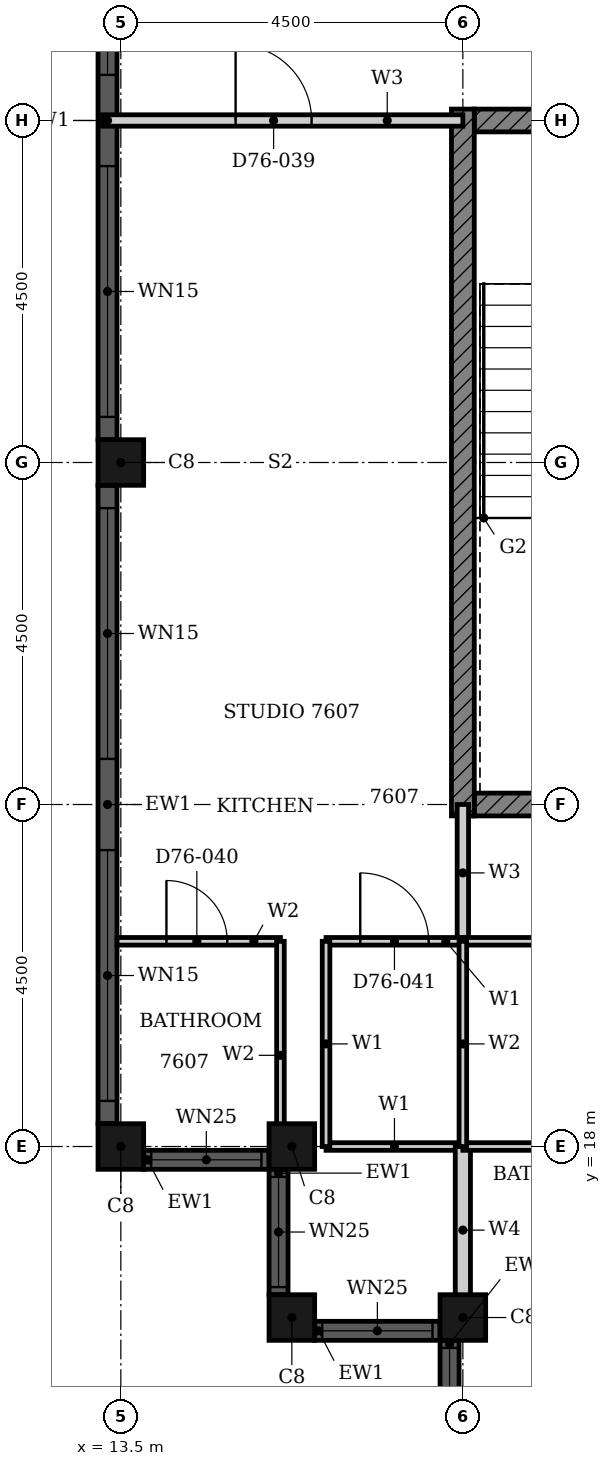
"""IFC4 building model, lengths in metres.
Left out: names, types, materials, properties, quantities, classifications, styles, units other than length and angle.
Written with IfcOpenShell. Run it as: python <this file> out.ifc"""

import sys

from ifc_helpers import new_model, si_unit, direction, frame, frame_2d, origin, origin_2d, place, context, subcontext, project, spatial, rectangle, hollow_rectangle, extrude, element, fill, save


model = new_model("IFC4")
c1 = context("Model", 3, precision=1e-05, world=origin(), true_north=direction((0.0, 1.0)))
c2 = subcontext(c1, "Body", "Model", "MODEL_VIEW")
j1 = project(units=[si_unit("LENGTHUNIT", "METRE"), si_unit("PLANEANGLEUNIT", "RADIAN")], contexts=[c1])
p1 = place(None, origin())
s1 = spatial("IfcSite", under=j1, at=p1, CompositionType="ELEMENT")
p2 = place(p1, origin())
s2 = spatial("IfcBuilding", under=s1, at=p2, CompositionType="ELEMENT")
p3 = place(p2, frame((0.0, 0.0, 298.2)))
s3 = spatial("IfcBuildingStorey", under=s2, at=p3, CompositionType="ELEMENT", Elevation=298.2)
for number, where, z_axis, x_axis in (
    (1, (13.5, 27.0, 0.0), (0.0, 0.0, 1.0), (1.0, 0.0, 0.0)),
    (2, (13.5, 18.0, 0.0), (0.0, 0.0, 1.0), (1.0, 0.0, 0.0)),
    (3, (15.75, 18.0, 0.0), (0.0, 0.0, 1.0), (1.0, 0.0, 0.0)),
    (4, (15.75, 15.75, 0.0), (0.0, 0.0, 1.0), (1.0, 0.0, 0.0)),
    (5, (18.0, 15.75, 0.0), (0.0, 0.0, 1.0), (1.0, 0.0, 0.0)),
):
    element("IfcColumn", number, at=place(p3, frame(where, z_axis=z_axis, x_axis=x_axis)), inside=s3, PredefinedType="COLUMN", context=c2, shape_type="SweptSolid", body=[
        extrude(hollow_rectangle(XDim=0.6, YDim=0.6, WallThickness=0.02, at=origin_2d()), origin(), (0.0, 0.0, 1.0), 3.7),
    ])
p4 = place(p3, frame((13.325, 35.7, 0.0), z_axis=(0.0, 0.0, 1.0), x_axis=(0.0, -1.0, 0.0)))
e6 = element("IfcWall", 6, at=p4, inside=s3, PredefinedType="SOLIDWALL", context=c2, shape_type="SweptSolid", body=[
    extrude(rectangle(XDim=8.4, YDim=0.25, at=frame_2d((4.2, 0.0))), origin(), (0.0, 0.0, 1.0), 3.7),
])
p5 = place(p4, frame((0.3, 0.0, 0.45)))
e7 = element("IfcOpeningElement", 7, at=p5, cuts=e6, PredefinedType="OPENING", context=c2, shape_type="SweptSolid", body=[
    extrude(rectangle(XDim=3.3, YDim=2.3, at=frame_2d((1.65, 1.15))), frame((0.0, 0.135, 0.0), z_axis=(0.0, -1.0, 0.0), x_axis=(1.0, 0.0, 0.0)), (0.0, 0.0, 1.0), 0.27),
])
p6 = place(p4, frame((4.8, 0.0, 0.45)))
e8 = element("IfcOpeningElement", 8, at=p6, cuts=e6, PredefinedType="OPENING", context=c2, shape_type="SweptSolid", body=[
    extrude(rectangle(XDim=3.3, YDim=2.3, at=frame_2d((1.65, 1.15))), frame((0.0, 0.135, 0.0), z_axis=(0.0, -1.0, 0.0), x_axis=(1.0, 0.0, 0.0)), (0.0, 0.0, 1.0), 0.27),
])
p7 = place(p3, frame((13.325, 26.7, 0.0), z_axis=(0.0, 0.0, 1.0), x_axis=(0.0, -1.0, 0.0)))
e9 = element("IfcWall", 9, at=p7, inside=s3, PredefinedType="SOLIDWALL", context=c2, shape_type="SweptSolid", body=[
    extrude(rectangle(XDim=8.4, YDim=0.25, at=frame_2d((4.2, 0.0))), origin(), (0.0, 0.0, 1.0), 3.7),
])
p8 = place(p7, frame((0.3, 0.0, 0.45)))
e10 = element("IfcOpeningElement", 10, at=p8, cuts=e9, PredefinedType="OPENING", context=c2, shape_type="SweptSolid", body=[
    extrude(rectangle(XDim=3.3, YDim=2.3, at=frame_2d((1.65, 1.15))), frame((0.0, 0.135, 0.0), z_axis=(0.0, -1.0, 0.0), x_axis=(1.0, 0.0, 0.0)), (0.0, 0.0, 1.0), 0.27),
])
p9 = place(p7, frame((4.8, 0.0, 0.45)))
e11 = element("IfcOpeningElement", 11, at=p9, cuts=e9, PredefinedType="OPENING", context=c2, shape_type="SweptSolid", body=[
    extrude(rectangle(XDim=3.3, YDim=2.3, at=frame_2d((1.65, 1.15))), frame((0.0, 0.135, 0.0), z_axis=(0.0, -1.0, 0.0), x_axis=(1.0, 0.0, 0.0)), (0.0, 0.0, 1.0), 0.27),
])
p10 = place(p3, frame((13.8, 17.825, 0.0), z_axis=(0.0, 0.0, 1.0), x_axis=(1.0, 0.0, 0.0)))
e12 = element("IfcWall", 12, at=p10, inside=s3, PredefinedType="SOLIDWALL", context=c2, shape_type="SweptSolid", body=[
    extrude(rectangle(XDim=1.65, YDim=0.25, at=frame_2d((0.825, 0.0))), origin(), (0.0, 0.0, 1.0), 3.7),
])
p11 = place(p10, frame((0.1, 0.0, 0.9)))
e13 = element("IfcOpeningElement", 13, at=p11, cuts=e12, PredefinedType="OPENING", context=c2, shape_type="SweptSolid", body=[
    extrude(rectangle(XDim=1.45, YDim=1.85, at=frame_2d((0.725, 0.925))), frame((0.0, 0.135, 0.0), z_axis=(0.0, -1.0, 0.0), x_axis=(1.0, 0.0, 0.0)), (0.0, 0.0, 1.0), 0.27),
])
p12 = place(p3, frame((15.575, 17.7, 0.0), z_axis=(0.0, 0.0, 1.0), x_axis=(0.0, -1.0, 0.0)))
e14 = element("IfcWall", 14, at=p12, inside=s3, PredefinedType="SOLIDWALL", context=c2, shape_type="SweptSolid", body=[
    extrude(rectangle(XDim=1.65, YDim=0.25, at=frame_2d((0.825, 0.0))), origin(), (0.0, 0.0, 1.0), 3.7),
])
p13 = place(p12, frame((0.1, 0.0, 0.9)))
e15 = element("IfcOpeningElement", 15, at=p13, cuts=e14, PredefinedType="OPENING", context=c2, shape_type="SweptSolid", body=[
    extrude(rectangle(XDim=1.45, YDim=1.85, at=frame_2d((0.725, 0.925))), frame((0.0, 0.135, 0.0), z_axis=(0.0, -1.0, 0.0), x_axis=(1.0, 0.0, 0.0)), (0.0, 0.0, 1.0), 0.27),
])
p14 = place(p3, frame((16.05, 15.575, 0.0), z_axis=(0.0, 0.0, 1.0), x_axis=(1.0, 0.0, 0.0)))
e16 = element("IfcWall", 16, at=p14, inside=s3, PredefinedType="SOLIDWALL", context=c2, shape_type="SweptSolid", body=[
    extrude(rectangle(XDim=1.65, YDim=0.25, at=frame_2d((0.825, 0.0))), origin(), (0.0, 0.0, 1.0), 3.7),
])
p15 = place(p14, frame((0.1, 0.0, 0.9)))
e17 = element("IfcOpeningElement", 17, at=p15, cuts=e16, PredefinedType="OPENING", context=c2, shape_type="SweptSolid", body=[
    extrude(rectangle(XDim=1.45, YDim=1.85, at=frame_2d((0.725, 0.925))), frame((0.0, 0.135, 0.0), z_axis=(0.0, -1.0, 0.0), x_axis=(1.0, 0.0, 0.0)), (0.0, 0.0, 1.0), 0.27),
])
p16 = place(p3, frame((17.825, 15.45, 0.0), z_axis=(0.0, 0.0, 1.0), x_axis=(0.0, -1.0, 0.0)))
e18 = element("IfcWall", 18, at=p16, inside=s3, PredefinedType="SOLIDWALL", context=c2, shape_type="SweptSolid", body=[
    extrude(rectangle(XDim=1.65, YDim=0.25, at=frame_2d((0.825, 0.0))), origin(), (0.0, 0.0, 1.0), 3.7),
])
p17 = place(p16, frame((0.1, 0.0, 0.9)))
e19 = element("IfcOpeningElement", 19, at=p17, cuts=e18, PredefinedType="OPENING", context=c2, shape_type="SweptSolid", body=[
    extrude(rectangle(XDim=1.45, YDim=1.85, at=frame_2d((0.725, 0.925))), frame((0.0, 0.135, 0.0), z_axis=(0.0, -1.0, 0.0), x_axis=(1.0, 0.0, 0.0)), (0.0, 0.0, 1.0), 0.27),
])
p18 = place(p3, frame((18.15, 22.5, 0.0), z_axis=(0.0, 0.0, 1.0), x_axis=(1.0, 0.0, 0.0)))
e20 = element("IfcWall", 20, at=p18, inside=s3, PredefinedType="SHEAR", context=c2, shape_type="SweptSolid", body=[
    extrude(rectangle(XDim=4.225, YDim=0.3, at=frame_2d((2.113, 0.0))), origin(), (0.0, 0.0, 1.0), 3.4),
])
p19 = place(p3, frame((18.15, 31.5, 0.0), z_axis=(0.0, 0.0, 1.0), x_axis=(1.0, 0.0, 0.0)))
e21 = element("IfcWall", 21, at=p19, inside=s3, PredefinedType="SHEAR", context=c2, shape_type="SweptSolid", body=[
    extrude(rectangle(XDim=9.368, YDim=0.3, at=frame_2d((4.684, 0.0))), origin(), (0.0, 0.0, 1.0), 3.4),
])
p20 = place(p19, frame((4.736, 0.0, 0.0)))
e22 = element("IfcOpeningElement", 22, at=p20, cuts=e21, PredefinedType="OPENING", context=c2, shape_type="SweptSolid", body=[
    extrude(rectangle(XDim=1.8, YDim=2.1, at=frame_2d((0.9, 1.05))), frame((0.0, 0.16, 0.0), z_axis=(0.0, -1.0, 0.0), x_axis=(1.0, 0.0, 0.0)), (0.0, 0.0, 1.0), 0.32),
])
p21 = place(p3, frame((18.0, 22.35, 0.0), z_axis=(0.0, 0.0, 1.0), x_axis=(0.0, 1.0, 0.0)))
e23 = element("IfcWall", 23, at=p21, inside=s3, PredefinedType="SHEAR", context=c2, shape_type="SweptSolid", body=[
    extrude(rectangle(XDim=9.3, YDim=0.3, at=frame_2d((4.65, 0.0))), origin(), (0.0, 0.0, 1.0), 3.4),
])
p22 = place(p3, frame((13.26, 31.5, 0.0), z_axis=(0.0, 0.0, 1.0), x_axis=(1.0, 0.0, 0.0)))
e24 = element("IfcWall", 24, at=p22, inside=s3, PredefinedType="PARTITIONING", context=c2, shape_type="SweptSolid", body=[
    extrude(rectangle(XDim=4.74, YDim=0.15, at=frame_2d((2.37, 0.0))), origin(), (0.0, 0.0, 1.0), 3.4),
])
p23 = place(p22, frame((1.75, 0.0, 0.0)))
e25 = element("IfcOpeningElement", 25, at=p23, cuts=e24, PredefinedType="OPENING", context=c2, shape_type="SweptSolid", body=[
    extrude(rectangle(XDim=1.0, YDim=2.2, at=frame_2d((0.5, 1.1))), frame((0.0, 0.085, 0.0), z_axis=(0.0, -1.0, 0.0), x_axis=(1.0, 0.0, 0.0)), (0.0, 0.0, 1.0), 0.17),
])
p24 = place(p3, frame((18.0, 20.7, 0.0), z_axis=(0.0, 0.0, 1.0), x_axis=(0.0, 1.0, 0.0)))
e26 = element("IfcWall", 26, at=p24, inside=s3, PredefinedType="PARTITIONING", context=c2, shape_type="SweptSolid", body=[
    extrude(rectangle(XDim=1.8, YDim=0.15, at=frame_2d((0.9, 0.0))), origin(), (0.0, 0.0, 1.0), 3.4),
])
p25 = place(p3, frame((16.2, 18.0, 0.0), z_axis=(0.0, 0.0, 1.0), x_axis=(1.0, 0.0, 0.0)))
e27 = element("IfcWall", 27, at=p25, inside=s3, PredefinedType="PARTITIONING", context=c2, shape_type="SweptSolid", body=[
    extrude(rectangle(XDim=1.8, YDim=0.1, at=frame_2d((0.9, 0.0))), origin(), (0.0, 0.0, 1.0), 3.4),
])
p26 = place(p3, frame((16.2, 20.7, 0.0), z_axis=(0.0, 0.0, 1.0), x_axis=(1.0, 0.0, 0.0)))
e28 = element("IfcWall", 28, at=p26, inside=s3, PredefinedType="PARTITIONING", context=c2, shape_type="SweptSolid", body=[
    extrude(rectangle(XDim=1.8, YDim=0.1, at=frame_2d((0.9, 0.0))), origin(), (0.0, 0.0, 1.0), 3.4),
])
p27 = place(p26, frame((0.45, 0.0, 0.0)))
e29 = element("IfcOpeningElement", 29, at=p27, cuts=e28, PredefinedType="OPENING", context=c2, shape_type="SweptSolid", body=[
    extrude(rectangle(XDim=0.9, YDim=2.1, at=frame_2d((0.45, 1.05))), frame((0.0, 0.06, 0.0), z_axis=(0.0, -1.0, 0.0), x_axis=(1.0, 0.0, 0.0)), (0.0, 0.0, 1.0), 0.12),
])
p28 = place(p3, frame((16.2, 18.0, 0.0), z_axis=(0.0, 0.0, 1.0), x_axis=(0.0, 1.0, 0.0)))
e30 = element("IfcWall", 30, at=p28, inside=s3, PredefinedType="PARTITIONING", context=c2, shape_type="SweptSolid", body=[
    extrude(rectangle(XDim=2.7, YDim=0.1, at=frame_2d((1.35, 0.0))), origin(), (0.0, 0.0, 1.0), 3.4),
])
p29 = place(p3, frame((18.0, 15.8, 0.0), z_axis=(0.0, 0.0, 1.0), x_axis=(0.0, 1.0, 0.0)))
e31 = element("IfcWall", 31, at=p29, inside=s3, PredefinedType="PARTITIONING", context=c2, shape_type="SweptSolid", body=[
    extrude(rectangle(XDim=2.2, YDim=0.2, at=frame_2d((1.1, 0.0))), origin(), (0.0, 0.0, 1.0), 3.4),
])
for number, where, z_axis, x_axis in (
    (32, (18.0, 18.0, 0.0), (0.0, 0.0, 1.0), (1.0, 0.0, 0.0)),
    (33, (18.0, 20.7, 0.0), (0.0, 0.0, 1.0), (1.0, 0.0, 0.0)),
):
    element("IfcWall", number, at=place(p3, frame(where, z_axis=z_axis, x_axis=x_axis)), inside=s3, PredefinedType="PARTITIONING", context=c2, shape_type="SweptSolid", body=[
        extrude(rectangle(XDim=2.4, YDim=0.1, at=frame_2d((1.2, 0.0))), origin(), (0.0, 0.0, 1.0), 3.4),
    ])
p30 = place(p3, frame((13.45, 20.7, 0.0), z_axis=(0.0, 0.0, 1.0), x_axis=(1.0, 0.0, 0.0)))
e34 = element("IfcWall", 34, at=p30, inside=s3, PredefinedType="PARTITIONING", context=c2, shape_type="SweptSolid", body=[
    extrude(rectangle(XDim=2.15, YDim=0.1, at=frame_2d((1.075, 0.0))), origin(), (0.0, 0.0, 1.0), 3.4),
])
p31 = place(p30, frame((0.65, 0.0, 0.0)))
e35 = element("IfcOpeningElement", 35, at=p31, cuts=e34, PredefinedType="OPENING", context=c2, shape_type="SweptSolid", body=[
    extrude(rectangle(XDim=0.8, YDim=2.1, at=frame_2d((0.4, 1.05))), frame((0.0, 0.06, 0.0), z_axis=(0.0, -1.0, 0.0), x_axis=(1.0, 0.0, 0.0)), (0.0, 0.0, 1.0), 0.12),
])
p32 = place(p3, frame((15.6, 17.7, 0.0), z_axis=(0.0, 0.0, 1.0), x_axis=(0.0, 1.0, 0.0)))
e36 = element("IfcWall", 36, at=p32, inside=s3, PredefinedType="PARTITIONING", context=c2, shape_type="SweptSolid", body=[
    extrude(rectangle(XDim=3.0, YDim=0.1, at=frame_2d((1.5, 0.0))), origin(), (0.0, 0.0, 1.0), 3.4),
])
p33 = place(p3, frame((18.0, 18.0, 0.0), z_axis=(0.0, 0.0, 1.0), x_axis=(0.0, 1.0, 0.0)))
e37 = element("IfcWall", 37, at=p33, inside=s3, PredefinedType="PARTITIONING", context=c2, shape_type="SweptSolid", body=[
    extrude(rectangle(XDim=2.7, YDim=0.1, at=frame_2d((1.35, 0.0))), origin(), (0.0, 0.0, 1.0), 3.4),
])
p34 = place(p5, origin())
e38 = element("IfcWindow", 38, at=p34, inside=s3, PartitioningType="SINGLE_PANEL", PredefinedType="WINDOW", context=c2, shape_type="SweptSolid", body=[
    extrude(rectangle(XDim=3.3, YDim=2.3, at=frame_2d((1.65, 1.15))), frame((0.0, 0.03, 0.0), z_axis=(0.0, -1.0, 0.0), x_axis=(1.0, 0.0, 0.0)), (0.0, 0.0, 1.0), 0.06),
])
fill(e7, e38)
p35 = place(p6, origin())
e39 = element("IfcWindow", 39, at=p35, inside=s3, PartitioningType="SINGLE_PANEL", PredefinedType="WINDOW", context=c2, shape_type="SweptSolid", body=[
    extrude(rectangle(XDim=3.3, YDim=2.3, at=frame_2d((1.65, 1.15))), frame((0.0, 0.03, 0.0), z_axis=(0.0, -1.0, 0.0), x_axis=(1.0, 0.0, 0.0)), (0.0, 0.0, 1.0), 0.06),
])
fill(e8, e39)
p36 = place(p8, origin())
e40 = element("IfcWindow", 40, at=p36, inside=s3, PartitioningType="SINGLE_PANEL", PredefinedType="WINDOW", context=c2, shape_type="SweptSolid", body=[
    extrude(rectangle(XDim=3.3, YDim=2.3, at=frame_2d((1.65, 1.15))), frame((0.0, 0.03, 0.0), z_axis=(0.0, -1.0, 0.0), x_axis=(1.0, 0.0, 0.0)), (0.0, 0.0, 1.0), 0.06),
])
fill(e10, e40)
p37 = place(p9, origin())
e41 = element("IfcWindow", 41, at=p37, inside=s3, PartitioningType="SINGLE_PANEL", PredefinedType="WINDOW", context=c2, shape_type="SweptSolid", body=[
    extrude(rectangle(XDim=3.3, YDim=2.3, at=frame_2d((1.65, 1.15))), frame((0.0, 0.03, 0.0), z_axis=(0.0, -1.0, 0.0), x_axis=(1.0, 0.0, 0.0)), (0.0, 0.0, 1.0), 0.06),
])
fill(e11, e41)
p38 = place(p11, origin())
e42 = element("IfcWindow", 42, at=p38, inside=s3, PartitioningType="SINGLE_PANEL", PredefinedType="WINDOW", context=c2, shape_type="SweptSolid", body=[
    extrude(rectangle(XDim=1.45, YDim=1.85, at=frame_2d((0.725, 0.925))), frame((0.0, 0.03, 0.0), z_axis=(0.0, -1.0, 0.0), x_axis=(1.0, 0.0, 0.0)), (0.0, 0.0, 1.0), 0.06),
])
fill(e13, e42)
p39 = place(p13, origin())
e43 = element("IfcWindow", 43, at=p39, inside=s3, PartitioningType="SINGLE_PANEL", PredefinedType="WINDOW", context=c2, shape_type="SweptSolid", body=[
    extrude(rectangle(XDim=1.45, YDim=1.85, at=frame_2d((0.725, 0.925))), frame((0.0, 0.03, 0.0), z_axis=(0.0, -1.0, 0.0), x_axis=(1.0, 0.0, 0.0)), (0.0, 0.0, 1.0), 0.06),
])
fill(e15, e43)
p40 = place(p15, origin())
e44 = element("IfcWindow", 44, at=p40, inside=s3, PartitioningType="SINGLE_PANEL", PredefinedType="WINDOW", context=c2, shape_type="SweptSolid", body=[
    extrude(rectangle(XDim=1.45, YDim=1.85, at=frame_2d((0.725, 0.925))), frame((0.0, 0.03, 0.0), z_axis=(0.0, -1.0, 0.0), x_axis=(1.0, 0.0, 0.0)), (0.0, 0.0, 1.0), 0.06),
])
fill(e17, e44)
p41 = place(p17, origin())
e45 = element("IfcWindow", 45, at=p41, inside=s3, PartitioningType="SINGLE_PANEL", PredefinedType="WINDOW", context=c2, shape_type="SweptSolid", body=[
    extrude(rectangle(XDim=1.45, YDim=1.85, at=frame_2d((0.725, 0.925))), frame((0.0, 0.03, 0.0), z_axis=(0.0, -1.0, 0.0), x_axis=(1.0, 0.0, 0.0)), (0.0, 0.0, 1.0), 0.06),
])
fill(e19, e45)
p42 = place(p23, origin())
e46 = element("IfcDoor", 46, at=p42, inside=s3, OperationType="SINGLE_SWING_LEFT", PredefinedType="DOOR", context=c2, shape_type="SweptSolid", body=[
    extrude(rectangle(XDim=1.0, YDim=2.2, at=frame_2d((0.5, 1.1))), frame((0.0, 0.025, 0.0), z_axis=(0.0, -1.0, 0.0), x_axis=(1.0, 0.0, 0.0)), (0.0, 0.0, 1.0), 0.05),
])
fill(e25, e46)
p43 = place(p31, origin())
e47 = element("IfcDoor", 47, at=p43, inside=s3, OperationType="SINGLE_SWING_RIGHT", PredefinedType="DOOR", context=c2, shape_type="SweptSolid", body=[
    extrude(rectangle(XDim=0.8, YDim=2.1, at=frame_2d((0.4, 1.05))), frame((0.0, 0.025, 0.0), z_axis=(0.0, -1.0, 0.0), x_axis=(1.0, 0.0, 0.0)), (0.0, 0.0, 1.0), 0.05),
])
fill(e35, e47)
p44 = place(p27, origin())
e48 = element("IfcDoor", 48, at=p44, inside=s3, OperationType="SINGLE_SWING_LEFT", PredefinedType="DOOR", context=c2, shape_type="SweptSolid", body=[
    extrude(rectangle(XDim=0.9, YDim=2.1, at=frame_2d((0.45, 1.05))), frame((0.0, 0.025, 0.0), z_axis=(0.0, -1.0, 0.0), x_axis=(1.0, 0.0, 0.0)), (0.0, 0.0, 1.0), 0.05),
])
fill(e29, e48)
save(model, sys.argv[1])
